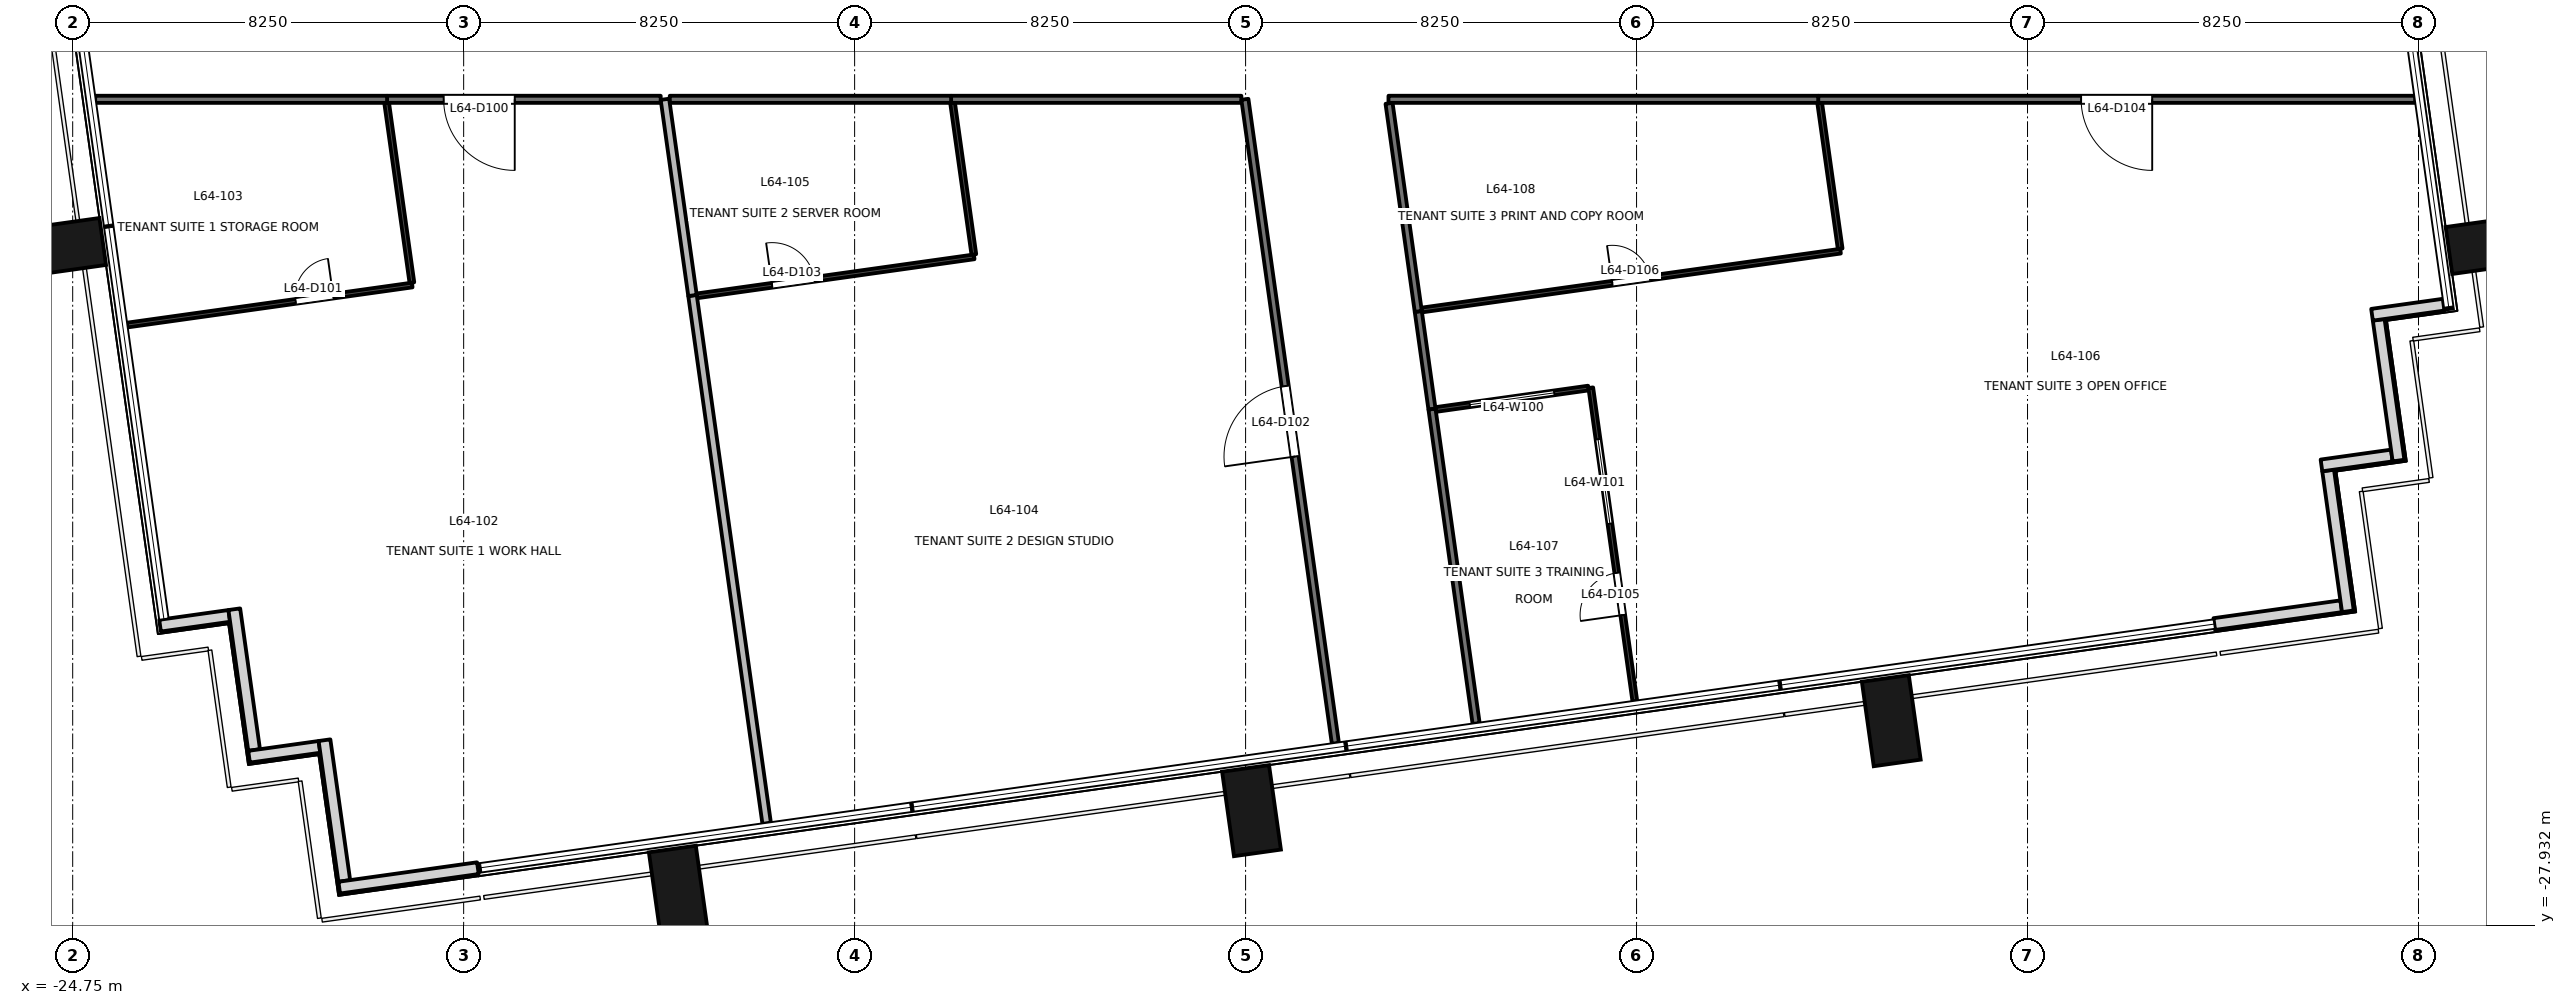
"""IFC4 building model, lengths in metres.
Left out: names, types, materials, properties, quantities, classifications, styles, units other than length and angle.
Written with IfcOpenShell. Run it as: python <this file> out.ifc"""

import sys

from ifc_helpers import new_model, si_unit, direction, frame, frame_2d, origin, origin_2d, place, context, subcontext, project, spatial, rectangle, extrude, element, fill, save


model = new_model("IFC4")
c1 = context("Model", 3, precision=1e-05, world=origin(), true_north=direction((0.0, 1.0)))
c2 = subcontext(c1, "Body", "Model", "MODEL_VIEW")
j1 = project(units=[si_unit("LENGTHUNIT", "METRE"), si_unit("PLANEANGLEUNIT", "RADIAN")], contexts=[c1])
p1 = place(None, origin())
s1 = spatial("IfcSite", under=j1, at=p1, CompositionType="ELEMENT")
p2 = place(p1, origin())
s2 = spatial("IfcBuilding", under=s1, at=p2, CompositionType="ELEMENT")
p3 = place(p2, frame((0.0, 0.0, 278.5)))
s3 = spatial("IfcBuildingStorey", under=s2, at=p3, CompositionType="ELEMENT", Elevation=278.5)
for number, where, z_axis, x_axis in (
    (1, (-11.971, -27.209, -0.2), (0.0, 0.0, 1.0), (0.99, 0.139, 0.0)),
    (2, (0.125, -25.508, -0.2), (0.0, 0.0, 1.0), (0.99, 0.139, 0.0)),
    (3, (13.625, -23.61, -0.2), (0.0, 0.0, 1.0), (0.99, 0.139, 0.0)),
    (4, (-25.007, -13.625, -0.2), (0.0, 0.0, 1.0), (-0.139, 0.99, 0.0)),
    (5, (26.284, -13.565, -0.2), (0.0, 0.0, 1.0), (-0.139, 0.99, 0.0)),
):
    element("IfcColumn", number, at=place(p3, frame(where, z_axis=z_axis, x_axis=x_axis)), inside=s3, PredefinedType="COLUMN", context=c2, shape_type="SweptSolid", body=[
        extrude(rectangle(XDim=1.0, YDim=1.8, at=origin_2d()), origin(), (0.0, 0.0, 1.0), 3.9),
    ])
p4 = place(p3, frame((20.44, -21.572, 0.0), z_axis=(0.0, 0.0, 1.0), x_axis=(0.990293105353, 0.138994839796, 0.0)))
e6 = element("IfcWall", 6, at=p4, inside=s3, PredefinedType="SOLIDWALL", context=c2, shape_type="SweptSolid", body=[
    extrude(rectangle(XDim=2.705, YDim=0.25, at=frame_2d((1.353, 0.0))), origin(), (0.0, 0.0, 1.0), 3.7),
])
p5 = place(p3, frame((23.26, -21.302, 0.0), z_axis=(0.0, 0.0, 1.0), x_axis=(-0.138994228812, 0.990293191109, 0.0)))
e7 = element("IfcWall", 7, at=p5, inside=s3, PredefinedType="SOLIDWALL", context=c2, shape_type="SweptSolid", body=[
    extrude(rectangle(XDim=3.0, YDim=0.25, at=frame_2d((1.5, 0.0))), origin(), (0.0, 0.0, 1.0), 3.7),
])
p6 = place(p3, frame((22.702, -18.225, 0.0), z_axis=(0.0, 0.0, 1.0), x_axis=(0.990243596651, 0.13934711799, 0.0)))
e8 = element("IfcWall", 8, at=p6, inside=s3, PredefinedType="SOLIDWALL", context=c2, shape_type="SweptSolid", body=[
    extrude(rectangle(XDim=1.5, YDim=0.25, at=frame_2d((0.75, 0.0))), origin(), (0.0, 0.0, 1.0), 3.7),
])
p7 = place(p3, frame((24.328, -18.122, 0.0), z_axis=(0.0, 0.0, 1.0), x_axis=(-0.139358350296, 0.990242015975, 0.0)))
e9 = element("IfcWall", 9, at=p7, inside=s3, PredefinedType="SOLIDWALL", context=c2, shape_type="SweptSolid", body=[
    extrude(rectangle(XDim=2.999, YDim=0.25, at=frame_2d((1.5, 0.0))), origin(), (0.0, 0.0, 1.0), 3.7),
])
p8 = place(p3, frame((23.769, -15.046, 0.0), z_axis=(0.0, 0.0, 1.0), x_axis=(0.990260716096, 0.139225407725, 0.0)))
e10 = element("IfcWall", 10, at=p8, inside=s3, PredefinedType="SOLIDWALL", context=c2, shape_type="SweptSolid", body=[
    extrude(rectangle(XDim=1.526, YDim=0.25, at=frame_2d((0.763, 0.0))), origin(), (0.0, 0.0, 1.0), 3.7),
])
p9 = place(p3, frame((-22.906, -21.605, 0.0), z_axis=(0.0, 0.0, 1.0), x_axis=(0.990235520307, 0.13940449893, 0.0)))
e11 = element("IfcWall", 11, at=p9, inside=s3, PredefinedType="SOLIDWALL", context=c2, shape_type="SweptSolid", body=[
    extrude(rectangle(XDim=1.475, YDim=0.25, at=frame_2d((0.737, 0.0))), origin(), (0.0, 0.0, 1.0), 3.7),
])
p10 = place(p3, frame((-21.34, -21.258, 0.0), z_axis=(0.0, 0.0, 1.0), x_axis=(0.139393225799, -0.990237107263, 0.0)))
e12 = element("IfcWall", 12, at=p10, inside=s3, PredefinedType="SOLIDWALL", context=c2, shape_type="SweptSolid", body=[
    extrude(rectangle(XDim=3.0, YDim=0.25, at=frame_2d((1.5, 0.0))), origin(), (0.0, 0.0, 1.0), 3.7),
])
p11 = place(p3, frame((-21.028, -24.37, 0.0), z_axis=(0.0, 0.0, 1.0), x_axis=(0.990330117064, 0.138730887823, 0.0)))
e13 = element("IfcWall", 13, at=p11, inside=s3, PredefinedType="SOLIDWALL", context=c2, shape_type="SweptSolid", body=[
    extrude(rectangle(XDim=1.499, YDim=0.25, at=frame_2d((0.75, 0.0))), origin(), (0.0, 0.0, 1.0), 3.7),
])
p12 = place(p3, frame((-19.437, -24.021, 0.0), z_axis=(0.0, 0.0, 1.0), x_axis=(0.139358350296, -0.990242015975, 0.0)))
e14 = element("IfcWall", 14, at=p12, inside=s3, PredefinedType="SOLIDWALL", context=c2, shape_type="SweptSolid", body=[
    extrude(rectangle(XDim=2.999, YDim=0.25, at=frame_2d((1.5, 0.0))), origin(), (0.0, 0.0, 1.0), 3.7),
])
p13 = place(p3, frame((-19.125, -27.132, 0.0), z_axis=(0.0, 0.0, 1.0), x_axis=(0.990291981483, 0.139002846771, 0.0)))
e15 = element("IfcWall", 15, at=p13, inside=s3, PredefinedType="SOLIDWALL", context=c2, shape_type="SweptSolid", body=[
    extrude(rectangle(XDim=2.954, YDim=0.25, at=frame_2d((1.477, 0.0))), origin(), (0.0, 0.0, 1.0), 3.7),
])
p14 = place(p3, frame((-12.342, -10.5, 0.0), z_axis=(0.0, 0.0, 1.0), x_axis=(-1.0, 0.0, 0.0)))
e16 = element("IfcWall", 16, at=p14, inside=s3, PredefinedType="PARTITIONING", context=c2, shape_type="SweptSolid", body=[
    extrude(rectangle(XDim=5.774, YDim=0.15, at=frame_2d((2.887, 0.0))), origin(), (0.0, 0.0, 1.0), 2.8),
])
p15 = place(p14, frame((3.08, 0.0, 0.0)))
e17 = element("IfcOpeningElement", 17, at=p15, cuts=e16, PredefinedType="OPENING", context=c2, shape_type="SweptSolid", body=[
    extrude(rectangle(XDim=1.5, YDim=2.1, at=frame_2d((0.75, 1.05))), frame((0.0, 0.085, 0.0), z_axis=(0.0, -1.0, 0.0), x_axis=(1.0, 0.0, 0.0)), (0.0, 0.0, 1.0), 0.171),
])
p16 = place(p3, frame((-18.116, -10.5, 0.0), z_axis=(0.0, 0.0, 1.0), x_axis=(-1.0, 0.0, 0.0)))
e18 = element("IfcWall", 18, at=p16, inside=s3, PredefinedType="PARTITIONING", context=c2, shape_type="SweptSolid", body=[
    extrude(rectangle(XDim=6.159, YDim=0.15, at=frame_2d((3.08, 0.0))), origin(), (0.0, 0.0, 1.0), 3.7),
])
p17 = place(p3, frame((-0.089, -10.5, 0.0), z_axis=(0.0, 0.0, 1.0), x_axis=(-1.0, 0.0, 0.0)))
e19 = element("IfcWall", 19, at=p17, inside=s3, PredefinedType="PARTITIONING", context=c2, shape_type="SweptSolid", body=[
    extrude(rectangle(XDim=6.125, YDim=0.15, at=frame_2d((3.062, 0.0))), origin(), (0.0, 0.0, 1.0), 2.8),
])
p18 = place(p3, frame((1.895, -24.088, 0.0), z_axis=(0.0, 0.0, 1.0), x_axis=(-0.139191583649, 0.990265470993, 0.0)))
e20 = element("IfcWall", 20, at=p18, inside=s3, PredefinedType="PARTITIONING", context=c2, shape_type="SweptSolid", body=[
    extrude(rectangle(XDim=13.721, YDim=0.15, at=frame_2d((6.861, 0.0))), origin(), (0.0, 0.0, 1.0), 2.9),
])
p19 = place(p18, frame((6.111, 0.0, 0.0)))
e21 = element("IfcOpeningElement", 21, at=p19, cuts=e20, PredefinedType="OPENING", context=c2, shape_type="SweptSolid", body=[
    extrude(rectangle(XDim=1.5, YDim=2.1, at=frame_2d((0.75, 1.05))), frame((0.0, 0.085, 0.0), z_axis=(0.0, -1.0, 0.0), x_axis=(1.0, 0.0, 0.0)), (0.0, 0.0, 1.0), 0.171),
])
p20 = place(p3, frame((-6.214, -10.5, 0.0), z_axis=(0.0, 0.0, 1.0), x_axis=(-1.0, 0.0, 0.0)))
e22 = element("IfcWall", 22, at=p20, inside=s3, PredefinedType="PARTITIONING", context=c2, shape_type="SweptSolid", body=[
    extrude(rectangle(XDim=5.937, YDim=0.15, at=frame_2d((2.968, 0.0))), origin(), (0.0, 0.0, 1.0), 2.8),
])
p21 = place(p3, frame((3.644, -14.976, 0.0), z_axis=(0.0, 0.0, 1.0), x_axis=(0.13897247285, -0.990296244459, 0.0)))
e23 = element("IfcWall", 23, at=p21, inside=s3, PredefinedType="PARTITIONING", context=c2, shape_type="SweptSolid", body=[
    extrude(rectangle(XDim=2.08, YDim=0.15, at=frame_2d((1.04, 0.0))), origin(), (0.0, 0.0, 1.0), 3.7),
])
p22 = place(p3, frame((24.68, -10.5, 0.0), z_axis=(0.0, 0.0, 1.0), x_axis=(-1.0, 0.0, 0.0)))
e24 = element("IfcWall", 24, at=p22, inside=s3, PredefinedType="PARTITIONING", context=c2, shape_type="SweptSolid", body=[
    extrude(rectangle(XDim=12.597, YDim=0.15, at=frame_2d((6.298, 0.0))), origin(), (0.0, 0.0, 1.0), 3.0),
])
p23 = place(p22, frame((5.549, 0.0, 0.0)))
e25 = element("IfcOpeningElement", 25, at=p23, cuts=e24, PredefinedType="OPENING", context=c2, shape_type="SweptSolid", body=[
    extrude(rectangle(XDim=1.5, YDim=2.1, at=frame_2d((0.75, 1.05))), frame((0.0, 0.085, 0.0), z_axis=(0.0, -1.0, 0.0), x_axis=(1.0, 0.0, 0.0)), (0.0, 0.0, 1.0), 0.171),
])
p24 = place(p3, frame((3.933, -17.036, 0.0), z_axis=(0.0, 0.0, 1.0), x_axis=(0.13910462383, -0.99027769016, 0.0)))
e26 = element("IfcWall", 26, at=p24, inside=s3, PredefinedType="PARTITIONING", context=c2, shape_type="SweptSolid", body=[
    extrude(rectangle(XDim=6.699, YDim=0.15, at=frame_2d((3.35, 0.0))), origin(), (0.0, 0.0, 1.0), 2.9),
])
p25 = place(p3, frame((3.027, -10.585, 0.0), z_axis=(0.0, 0.0, 1.0), x_axis=(0.139131664816, -0.990273891328, 0.0)))
e27 = element("IfcWall", 27, at=p25, inside=s3, PredefinedType="PARTITIONING", context=c2, shape_type="SweptSolid", body=[
    extrude(rectangle(XDim=4.434, YDim=0.15, at=frame_2d((2.217, 0.0))), origin(), (0.0, 0.0, 1.0), 3.7),
])
p26 = place(p3, frame((12.083, -10.5, 0.0), z_axis=(0.0, 0.0, 1.0), x_axis=(-1.0, 0.0, 0.0)))
e28 = element("IfcWall", 28, at=p26, inside=s3, PredefinedType="PARTITIONING", context=c2, shape_type="SweptSolid", body=[
    extrude(rectangle(XDim=9.068, YDim=0.15, at=frame_2d((4.534, 0.0))), origin(), (0.0, 0.0, 1.0), 2.9),
])
p27 = place(p3, frame((-23.606, -15.264, 0.0), z_axis=(0.0, 0.0, 1.0), x_axis=(0.990273701851, 0.139133013418, 0.0)))
e29 = element("IfcWall", 29, at=p27, inside=s3, PredefinedType="PARTITIONING", context=c2, shape_type="SweptSolid", body=[
    extrude(rectangle(XDim=6.08, YDim=0.1, at=frame_2d((3.04, 0.0))), origin(), (0.0, 0.0, 1.0), 3.7),
])
p28 = place(p27, frame((3.596, 0.0, 0.0)))
e30 = element("IfcOpeningElement", 30, at=p28, cuts=e29, PredefinedType="OPENING", context=c2, shape_type="SweptSolid", body=[
    extrude(rectangle(XDim=0.8, YDim=2.1, at=frame_2d((0.4, 1.05))), frame((0.0, 0.061, 0.0), z_axis=(0.0, -1.0, 0.0), x_axis=(1.0, 0.0, 0.0)), (0.0, 0.0, 1.0), 0.121),
])
p29 = place(p3, frame((-17.592, -14.368, 0.0), z_axis=(0.0, 0.0, 1.0), x_axis=(-0.139149544216, 0.99027137914, 0.0)))
e31 = element("IfcWall", 31, at=p29, inside=s3, PredefinedType="PARTITIONING", context=c2, shape_type="SweptSolid", body=[
    extrude(rectangle(XDim=3.837, YDim=0.1, at=frame_2d((1.918, 0.0))), origin(), (0.0, 0.0, 1.0), 3.7),
])
p30 = place(p3, frame((-11.671, -14.639, 0.0), z_axis=(0.0, 0.0, 1.0), x_axis=(0.139162688284, -0.990269532092, 0.0)))
e32 = element("IfcWall", 32, at=p30, inside=s3, PredefinedType="PARTITIONING", context=c2, shape_type="SweptSolid", body=[
    extrude(rectangle(XDim=11.245, YDim=0.18, at=frame_2d((5.623, 0.0))), origin(), (0.0, 0.0, 1.0), 3.7),
])
p31 = place(p3, frame((-12.253, -10.5, 0.0), z_axis=(0.0, 0.0, 1.0), x_axis=(0.139253936412, -0.990256704695, 0.0)))
e33 = element("IfcWall", 33, at=p31, inside=s3, PredefinedType="PARTITIONING", context=c2, shape_type="SweptSolid", body=[
    extrude(rectangle(XDim=4.18, YDim=0.18, at=frame_2d((2.09, 0.0))), origin(), (0.0, 0.0, 1.0), 3.7),
])
p32 = place(p3, frame((-11.579, -14.647, 0.0), z_axis=(0.0, 0.0, 1.0), x_axis=(0.990255332606, 0.139263693209, 0.0)))
e34 = element("IfcWall", 34, at=p32, inside=s3, PredefinedType="PARTITIONING", context=c2, shape_type="SweptSolid", body=[
    extrude(rectangle(XDim=5.91, YDim=0.1, at=frame_2d((2.955, 0.0))), origin(), (0.0, 0.0, 1.0), 2.8),
])
p33 = place(p32, frame((1.603, 0.0, 0.0)))
e35 = element("IfcOpeningElement", 35, at=p33, cuts=e34, PredefinedType="OPENING", context=c2, shape_type="SweptSolid", body=[
    extrude(rectangle(XDim=0.9, YDim=2.1, at=frame_2d((0.45, 1.05))), frame((0.0, 0.061, 0.0), z_axis=(0.0, -1.0, 0.0), x_axis=(1.0, 0.0, 0.0)), (0.0, 0.0, 1.0), 0.121),
])
p34 = place(p3, frame((-5.734, -13.774, 0.0), z_axis=(0.0, 0.0, 1.0), x_axis=(-0.139066479304, 0.990283047585, 0.0)))
e36 = element("IfcWall", 36, at=p34, inside=s3, PredefinedType="PARTITIONING", context=c2, shape_type="SweptSolid", body=[
    extrude(rectangle(XDim=3.237, YDim=0.1, at=frame_2d((1.619, 0.0))), origin(), (0.0, 0.0, 1.0), 3.7),
])
p35 = place(p3, frame((7.234, -16.592, 0.0), z_axis=(0.0, 0.0, 1.0), x_axis=(-0.990276766322, -0.139111200419, 0.0)))
e37 = element("IfcWall", 37, at=p35, inside=s3, PredefinedType="PARTITIONING", context=c2, shape_type="SweptSolid", body=[
    extrude(rectangle(XDim=3.256, YDim=0.1, at=frame_2d((1.628, 0.0))), origin(), (0.0, 0.0, 1.0), 2.9),
])
p36 = place(p35, frame((0.728, 0.0, 0.9)))
e38 = element("IfcOpeningElement", 38, at=p36, cuts=e37, PredefinedType="OPENING", context=c2, shape_type="SweptSolid", body=[
    extrude(rectangle(XDim=1.8, YDim=1.2, at=frame_2d((0.9, 0.6))), frame((0.0, 0.061, 0.0), z_axis=(0.0, -1.0, 0.0), x_axis=(1.0, 0.0, 0.0)), (0.0, 0.0, 1.0), 0.121),
])
p37 = place(p3, frame((8.214, -23.198, 0.0), z_axis=(0.0, 0.0, 1.0), x_axis=(-0.139286759584, 0.990252088412, 0.0)))
e39 = element("IfcWall", 39, at=p37, inside=s3, PredefinedType="PARTITIONING", context=c2, shape_type="SweptSolid", body=[
    extrude(rectangle(XDim=6.678, YDim=0.1, at=frame_2d((3.339, 0.0))), origin(), (0.0, 0.0, 1.0), 3.7),
])
p38 = place(p37, frame((1.834, 0.0, 0.0)))
e40 = element("IfcOpeningElement", 40, at=p38, cuts=e39, PredefinedType="OPENING", context=c2, shape_type="SweptSolid", body=[
    extrude(rectangle(XDim=0.9, YDim=2.1, at=frame_2d((0.45, 1.05))), frame((0.0, 0.061, 0.0), z_axis=(0.0, -1.0, 0.0), x_axis=(1.0, 0.0, 0.0)), (0.0, 0.0, 1.0), 0.121),
])
p39 = place(p37, frame((3.781, 0.0, 0.9)))
e41 = element("IfcOpeningElement", 41, at=p39, cuts=e39, PredefinedType="OPENING", context=c2, shape_type="SweptSolid", body=[
    extrude(rectangle(XDim=1.8, YDim=1.2, at=frame_2d((0.9, 0.6))), frame((0.0, 0.061, 0.0), z_axis=(0.0, -1.0, 0.0), x_axis=(1.0, 0.0, 0.0)), (0.0, 0.0, 1.0), 0.121),
])
p40 = place(p3, frame((3.715, -14.946, 0.0), z_axis=(0.0, 0.0, 1.0), x_axis=(0.990272367152, 0.139142512753, 0.0)))
e42 = element("IfcWall", 42, at=p40, inside=s3, PredefinedType="PARTITIONING", context=c2, shape_type="SweptSolid", body=[
    extrude(rectangle(XDim=8.926, YDim=0.1, at=frame_2d((4.463, 0.0))), origin(), (0.0, 0.0, 1.0), 2.9),
])
p41 = place(p40, frame((4.063, 0.0, 0.0)))
e43 = element("IfcOpeningElement", 43, at=p41, cuts=e42, PredefinedType="OPENING", context=c2, shape_type="SweptSolid", body=[
    extrude(rectangle(XDim=0.8, YDim=2.1, at=frame_2d((0.4, 1.05))), frame((0.0, 0.061, 0.0), z_axis=(0.0, -1.0, 0.0), x_axis=(1.0, 0.0, 0.0)), (0.0, 0.0, 1.0), 0.121),
])
p42 = place(p3, frame((12.547, -13.654, 0.0), z_axis=(0.0, 0.0, 1.0), x_axis=(-0.139293243016, 0.990251176445, 0.0)))
e44 = element("IfcWall", 44, at=p42, inside=s3, PredefinedType="PARTITIONING", context=c2, shape_type="SweptSolid", body=[
    extrude(rectangle(XDim=3.116, YDim=0.1, at=frame_2d((1.558, 0.0))), origin(), (0.0, 0.0, 1.0), 3.7),
])
p43 = place(p15, origin())
e45 = element("IfcDoor", 45, at=p43, inside=s3, OperationType="DOUBLE_DOOR_SINGLE_SWING", PredefinedType="DOOR", context=c2, shape_type="SweptSolid", body=[
    extrude(rectangle(XDim=1.5, YDim=2.1, at=frame_2d((0.75, 1.05))), frame((0.0, 0.025, 0.0), z_axis=(0.0, -1.0, 0.0), x_axis=(1.0, 0.0, 0.0)), (0.0, 0.0, 1.0), 0.05),
])
fill(e17, e45)
p44 = place(p28, origin())
e46 = element("IfcDoor", 46, at=p44, inside=s3, OperationType="SINGLE_SWING_RIGHT", PredefinedType="DOOR", context=c2, shape_type="SweptSolid", body=[
    extrude(rectangle(XDim=0.8, YDim=2.1, at=frame_2d((0.4, 1.05))), frame((0.0, 0.025, 0.0), z_axis=(0.0, -1.0, 0.0), x_axis=(1.0, 0.0, 0.0)), (0.0, 0.0, 1.0), 0.05),
])
fill(e30, e46)
p45 = place(p19, origin())
e47 = element("IfcDoor", 47, at=p45, inside=s3, OperationType="DOUBLE_DOOR_SINGLE_SWING", PredefinedType="DOOR", context=c2, shape_type="SweptSolid", body=[
    extrude(rectangle(XDim=1.5, YDim=2.1, at=frame_2d((0.75, 1.05))), frame((0.0, 0.025, 0.0), z_axis=(0.0, -1.0, 0.0), x_axis=(1.0, 0.0, 0.0)), (0.0, 0.0, 1.0), 0.05),
])
fill(e21, e47)
p46 = place(p33, origin())
e48 = element("IfcDoor", 48, at=p46, inside=s3, OperationType="SINGLE_SWING_LEFT", PredefinedType="DOOR", context=c2, shape_type="SweptSolid", body=[
    extrude(rectangle(XDim=0.9, YDim=2.1, at=frame_2d((0.45, 1.05))), frame((0.0, 0.025, 0.0), z_axis=(0.0, -1.0, 0.0), x_axis=(1.0, 0.0, 0.0)), (0.0, 0.0, 1.0), 0.05),
])
fill(e35, e48)
p47 = place(p23, origin())
e49 = element("IfcDoor", 49, at=p47, inside=s3, OperationType="DOUBLE_DOOR_SINGLE_SWING", PredefinedType="DOOR", context=c2, shape_type="SweptSolid", body=[
    extrude(rectangle(XDim=1.5, YDim=2.1, at=frame_2d((0.75, 1.05))), frame((0.0, 0.025, 0.0), z_axis=(0.0, -1.0, 0.0), x_axis=(1.0, 0.0, 0.0)), (0.0, 0.0, 1.0), 0.05),
])
fill(e25, e49)
p48 = place(p38, origin())
e50 = element("IfcDoor", 50, at=p48, inside=s3, OperationType="SINGLE_SWING_LEFT", PredefinedType="DOOR", context=c2, shape_type="SweptSolid", body=[
    extrude(rectangle(XDim=0.9, YDim=2.1, at=frame_2d((0.45, 1.05))), frame((0.0, 0.025, 0.0), z_axis=(0.0, -1.0, 0.0), x_axis=(1.0, 0.0, 0.0)), (0.0, 0.0, 1.0), 0.05),
])
fill(e40, e50)
p49 = place(p41, origin())
e51 = element("IfcDoor", 51, at=p49, inside=s3, OperationType="SINGLE_SWING_LEFT", PredefinedType="DOOR", context=c2, shape_type="SweptSolid", body=[
    extrude(rectangle(XDim=0.8, YDim=2.1, at=frame_2d((0.4, 1.05))), frame((0.0, 0.025, 0.0), z_axis=(0.0, -1.0, 0.0), x_axis=(1.0, 0.0, 0.0)), (0.0, 0.0, 1.0), 0.05),
])
fill(e43, e51)
p50 = place(p36, origin())
e52 = element("IfcWindow", 52, at=p50, inside=s3, PartitioningType="SINGLE_PANEL", PredefinedType="WINDOW", context=c2, shape_type="SweptSolid", body=[
    extrude(rectangle(XDim=1.8, YDim=1.2, at=frame_2d((0.9, 0.6))), frame((0.0, 0.03, 0.0), z_axis=(0.0, -1.0, 0.0), x_axis=(1.0, 0.0, 0.0)), (0.0, 0.0, 1.0), 0.06),
])
fill(e38, e52)
p51 = place(p39, origin())
e53 = element("IfcWindow", 53, at=p51, inside=s3, PartitioningType="SINGLE_PANEL", PredefinedType="WINDOW", context=c2, shape_type="SweptSolid", body=[
    extrude(rectangle(XDim=1.8, YDim=1.2, at=frame_2d((0.9, 0.6))), frame((0.0, 0.03, 0.0), z_axis=(0.0, -1.0, 0.0), x_axis=(1.0, 0.0, 0.0)), (0.0, 0.0, 1.0), 0.06),
])
fill(e41, e53)
save(model, sys.argv[1])
